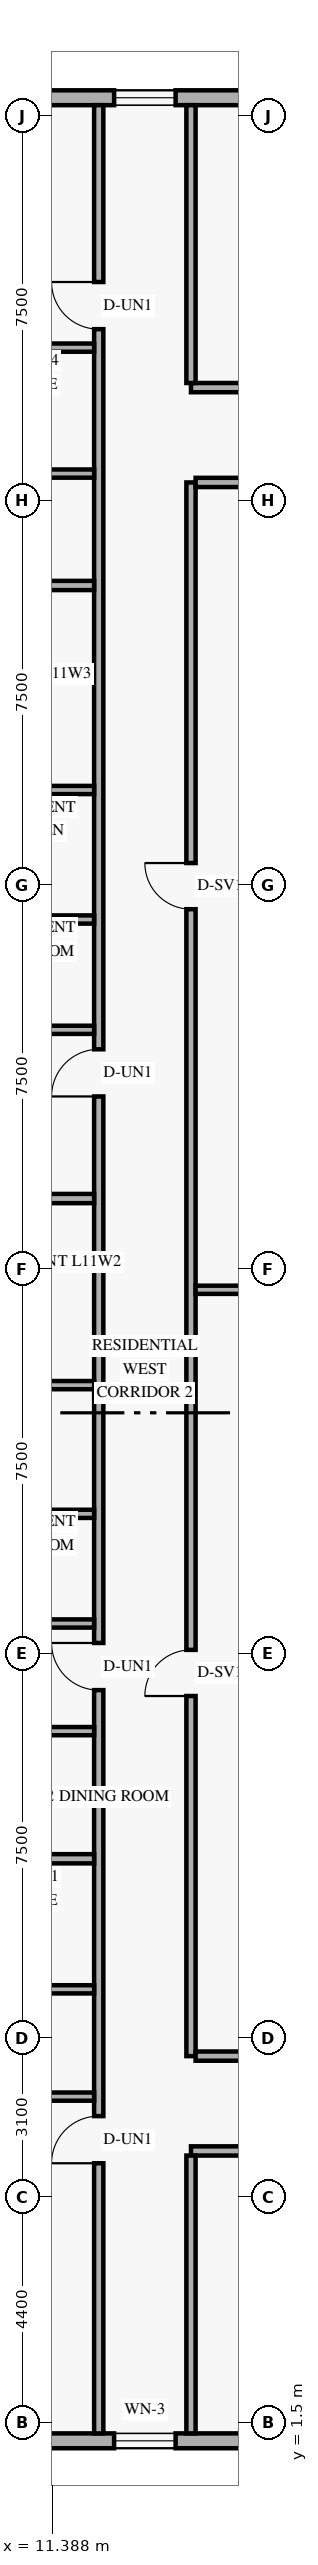
"""IFC4 building model, lengths in metres.
Left out: names, types, materials, properties, quantities, classifications, styles, units other than length and angle.
Written with IfcOpenShell. Run it as: python <this file> out.ifc"""

import sys

from ifc_helpers import new_model, si_unit, direction, frame, frame_2d, origin, place, context, subcontext, project, spatial, rectangle, extrude, element, fill, save


model = new_model("IFC4")
c1 = context("Model", 3, precision=1e-05, world=origin(), true_north=direction((0.0, 1.0)))
c2 = subcontext(c1, "Body", "Model", "MODEL_VIEW")
j1 = project(units=[si_unit("LENGTHUNIT", "METRE"), si_unit("PLANEANGLEUNIT", "RADIAN")], contexts=[c1])
p1 = place(None, origin())
s1 = spatial("IfcSite", under=j1, at=p1, CompositionType="ELEMENT")
p2 = place(p1, origin())
s2 = spatial("IfcBuilding", under=s1, at=p2, CompositionType="ELEMENT")
p3 = place(p2, frame((0.0, 0.0, 45.6)))
s3 = spatial("IfcBuildingStorey", under=s2, at=p3, CompositionType="ELEMENT", Elevation=45.6)
p4 = place(p3, frame((5.42, 1.145, 0.0), z_axis=(0.0, 0.0, 1.0), x_axis=(1.0, 0.0, 0.0)))
e1 = element("IfcWall", 1, at=p4, inside=s3, PredefinedType="SOLIDWALL", context=c2, shape_type="SweptSolid", body=[
    extrude(rectangle(XDim=39.56, YDim=0.29, at=frame_2d((19.78, 0.0))), origin(), (0.0, 0.0, 1.0), 3.36),
])
p5 = place(p4, frame((2.54, 0.0, 0.85)))
e2 = element("IfcOpeningElement", 2, at=p5, cuts=e1, PredefinedType="OPENING", context=c2, shape_type="SweptSolid", body=[
    extrude(rectangle(XDim=1.8, YDim=1.6, at=frame_2d((0.9, 0.8))), frame((0.0, 0.155, 0.0), z_axis=(0.0, -1.0, 0.0), x_axis=(1.0, 0.0, 0.0)), (0.0, 0.0, 1.0), 0.31),
])
p6 = place(p4, frame((7.18, 0.0, 0.85)))
e3 = element("IfcOpeningElement", 3, at=p6, cuts=e1, PredefinedType="OPENING", context=c2, shape_type="SweptSolid", body=[
    extrude(rectangle(XDim=1.2, YDim=1.5, at=frame_2d((0.6, 0.75))), frame((0.0, 0.155, 0.0), z_axis=(0.0, -1.0, 0.0), x_axis=(1.0, 0.0, 0.0)), (0.0, 0.0, 1.0), 0.31),
])
p7 = place(p4, frame((12.257, 0.0, 0.85)))
e4 = element("IfcOpeningElement", 4, at=p7, cuts=e1, PredefinedType="OPENING", context=c2, shape_type="SweptSolid", body=[
    extrude(rectangle(XDim=1.8, YDim=1.6, at=frame_2d((0.9, 0.8))), frame((0.0, 0.155, 0.0), z_axis=(0.0, -1.0, 0.0), x_axis=(1.0, 0.0, 0.0)), (0.0, 0.0, 1.0), 0.31),
])
p8 = place(p4, frame((20.847, 0.0, 0.85)))
e5 = element("IfcOpeningElement", 5, at=p8, cuts=e1, PredefinedType="OPENING", context=c2, shape_type="SweptSolid", body=[
    extrude(rectangle(XDim=1.8, YDim=1.6, at=frame_2d((0.9, 0.8))), frame((0.0, 0.155, 0.0), z_axis=(0.0, -1.0, 0.0), x_axis=(1.0, 0.0, 0.0)), (0.0, 0.0, 1.0), 0.31),
])
p9 = place(p4, frame((27.03, 0.0, 0.85)))
e6 = element("IfcOpeningElement", 6, at=p9, cuts=e1, PredefinedType="OPENING", context=c2, shape_type="SweptSolid", body=[
    extrude(rectangle(XDim=1.8, YDim=1.6, at=frame_2d((0.9, 0.8))), frame((0.0, 0.155, 0.0), z_axis=(0.0, -1.0, 0.0), x_axis=(1.0, 0.0, 0.0)), (0.0, 0.0, 1.0), 0.31),
])
p10 = place(p4, frame((30.465, 0.0, 0.85)))
e7 = element("IfcOpeningElement", 7, at=p10, cuts=e1, PredefinedType="OPENING", context=c2, shape_type="SweptSolid", body=[
    extrude(rectangle(XDim=1.2, YDim=1.5, at=frame_2d((0.6, 0.75))), frame((0.0, 0.155, 0.0), z_axis=(0.0, -1.0, 0.0), x_axis=(1.0, 0.0, 0.0)), (0.0, 0.0, 1.0), 0.31),
])
p11 = place(p4, frame((34.945, 0.0, 0.85)))
e8 = element("IfcOpeningElement", 8, at=p11, cuts=e1, PredefinedType="OPENING", context=c2, shape_type="SweptSolid", body=[
    extrude(rectangle(XDim=1.8, YDim=1.6, at=frame_2d((0.9, 0.8))), frame((0.0, 0.155, 0.0), z_axis=(0.0, -1.0, 0.0), x_axis=(1.0, 0.0, 0.0)), (0.0, 0.0, 1.0), 0.31),
])
p12 = place(p3, frame((44.98, 46.855, 0.0), z_axis=(0.0, 0.0, 1.0), x_axis=(-1.0, 0.0, 0.0)))
e9 = element("IfcWall", 9, at=p12, inside=s3, PredefinedType="SOLIDWALL", context=c2, shape_type="SweptSolid", body=[
    extrude(rectangle(XDim=39.56, YDim=0.29, at=frame_2d((19.78, 0.0))), origin(), (0.0, 0.0, 1.0), 3.36),
])
p13 = place(p12, frame((35.22, 0.0, 0.85)))
e10 = element("IfcOpeningElement", 10, at=p13, cuts=e9, PredefinedType="OPENING", context=c2, shape_type="SweptSolid", body=[
    extrude(rectangle(XDim=1.8, YDim=1.6, at=frame_2d((0.9, 0.8))), frame((0.0, 0.155, 0.0), z_axis=(0.0, -1.0, 0.0), x_axis=(1.0, 0.0, 0.0)), (0.0, 0.0, 1.0), 0.31),
])
p14 = place(p12, frame((31.18, 0.0, 0.85)))
e11 = element("IfcOpeningElement", 11, at=p14, cuts=e9, PredefinedType="OPENING", context=c2, shape_type="SweptSolid", body=[
    extrude(rectangle(XDim=1.2, YDim=1.5, at=frame_2d((0.6, 0.75))), frame((0.0, 0.155, 0.0), z_axis=(0.0, -1.0, 0.0), x_axis=(1.0, 0.0, 0.0)), (0.0, 0.0, 1.0), 0.31),
])
p15 = place(p12, frame((24.863, 0.0, 0.85)))
e12 = element("IfcOpeningElement", 12, at=p15, cuts=e9, PredefinedType="OPENING", context=c2, shape_type="SweptSolid", body=[
    extrude(rectangle(XDim=1.8, YDim=1.6, at=frame_2d((0.9, 0.8))), frame((0.0, 0.155, 0.0), z_axis=(0.0, -1.0, 0.0), x_axis=(1.0, 0.0, 0.0)), (0.0, 0.0, 1.0), 0.31),
])
p16 = place(p12, frame((16.273, 0.0, 0.85)))
e13 = element("IfcOpeningElement", 13, at=p16, cuts=e9, PredefinedType="OPENING", context=c2, shape_type="SweptSolid", body=[
    extrude(rectangle(XDim=1.8, YDim=1.6, at=frame_2d((0.9, 0.8))), frame((0.0, 0.155, 0.0), z_axis=(0.0, -1.0, 0.0), x_axis=(1.0, 0.0, 0.0)), (0.0, 0.0, 1.0), 0.31),
])
p17 = place(p12, frame((10.73, 0.0, 0.85)))
e14 = element("IfcOpeningElement", 14, at=p17, cuts=e9, PredefinedType="OPENING", context=c2, shape_type="SweptSolid", body=[
    extrude(rectangle(XDim=1.8, YDim=1.6, at=frame_2d((0.9, 0.8))), frame((0.0, 0.155, 0.0), z_axis=(0.0, -1.0, 0.0), x_axis=(1.0, 0.0, 0.0)), (0.0, 0.0, 1.0), 0.31),
])
p18 = place(p12, frame((7.895, 0.0, 0.85)))
e15 = element("IfcOpeningElement", 15, at=p18, cuts=e9, PredefinedType="OPENING", context=c2, shape_type="SweptSolid", body=[
    extrude(rectangle(XDim=1.2, YDim=1.5, at=frame_2d((0.6, 0.75))), frame((0.0, 0.155, 0.0), z_axis=(0.0, -1.0, 0.0), x_axis=(1.0, 0.0, 0.0)), (0.0, 0.0, 1.0), 0.31),
])
p19 = place(p12, frame((3.782, 0.0, 0.85)))
e16 = element("IfcOpeningElement", 16, at=p19, cuts=e9, PredefinedType="OPENING", context=c2, shape_type="SweptSolid", body=[
    extrude(rectangle(XDim=1.8, YDim=1.6, at=frame_2d((0.9, 0.8))), frame((0.0, 0.155, 0.0), z_axis=(0.0, -1.0, 0.0), x_axis=(1.0, 0.0, 0.0)), (0.0, 0.0, 1.0), 0.31),
])
p20 = place(p12, frame((0.367, 0.0, 0.85)))
e17 = element("IfcOpeningElement", 17, at=p20, cuts=e9, PredefinedType="OPENING", context=c2, shape_type="SweptSolid", body=[
    extrude(rectangle(XDim=1.2, YDim=1.5, at=frame_2d((0.6, 0.75))), frame((0.0, 0.155, 0.0), z_axis=(0.0, -1.0, 0.0), x_axis=(1.0, 0.0, 0.0)), (0.0, 0.0, 1.0), 0.31),
])
p21 = place(p3, frame((14.1, 6.8, 0.0), z_axis=(0.0, 0.0, 1.0), x_axis=(1.0, 0.0, 0.0)))
e18 = element("IfcWall", 18, at=p21, inside=s3, PredefinedType="STANDARD", context=c2, shape_type="SweptSolid", body=[
    extrude(rectangle(XDim=21.32, YDim=0.18, at=frame_2d((10.66, 0.0))), origin(), (0.0, 0.0, 1.0), 2.649),
])
p22 = place(p21, frame((1.5, 0.0, 0.0)))
e19 = element("IfcOpeningElement", 19, at=p22, cuts=e18, PredefinedType="OPENING", context=c2, shape_type="SweptSolid", body=[
    extrude(rectangle(XDim=0.95, YDim=2.15, at=frame_2d((0.475, 1.075))), frame((0.0, 0.1, 0.0), z_axis=(0.0, -1.0, 0.0), x_axis=(1.0, 0.0, 0.0)), (0.0, 0.0, 1.0), 0.2),
])
p23 = place(p21, frame((10.625, 0.0, 0.0)))
e20 = element("IfcOpeningElement", 20, at=p23, cuts=e18, PredefinedType="OPENING", context=c2, shape_type="SweptSolid", body=[
    extrude(rectangle(XDim=0.92, YDim=2.15, at=frame_2d((0.46, 1.075))), frame((0.0, 0.1, 0.0), z_axis=(0.0, -1.0, 0.0), x_axis=(1.0, 0.0, 0.0)), (0.0, 0.0, 1.0), 0.2),
])
p24 = place(p3, frame((14.1, 41.2, 0.0), z_axis=(0.0, 0.0, 1.0), x_axis=(1.0, 0.0, 0.0)))
e21 = element("IfcWall", 21, at=p24, inside=s3, PredefinedType="STANDARD", context=c2, shape_type="SweptSolid", body=[
    extrude(rectangle(XDim=21.32, YDim=0.18, at=frame_2d((10.66, 0.0))), origin(), (0.0, 0.0, 1.0), 2.649),
])
p25 = place(p24, frame((1.6, 0.0, 0.0)))
e22 = element("IfcOpeningElement", 22, at=p25, cuts=e21, PredefinedType="OPENING", context=c2, shape_type="SweptSolid", body=[
    extrude(rectangle(XDim=0.95, YDim=2.15, at=frame_2d((0.475, 1.075))), frame((0.0, 0.1, 0.0), z_axis=(0.0, -1.0, 0.0), x_axis=(1.0, 0.0, 0.0)), (0.0, 0.0, 1.0), 0.2),
])
p26 = place(p24, frame((10.644, 0.0, 0.0)))
e23 = element("IfcOpeningElement", 23, at=p26, cuts=e21, PredefinedType="OPENING", context=c2, shape_type="SweptSolid", body=[
    extrude(rectangle(XDim=0.92, YDim=2.15, at=frame_2d((0.46, 1.075))), frame((0.0, 0.1, 0.0), z_axis=(0.0, -1.0, 0.0), x_axis=(1.0, 0.0, 0.0)), (0.0, 0.0, 1.0), 0.2),
])
p27 = place(p3, frame((12.3, 1.29, 0.0), z_axis=(0.0, 0.0, 1.0), x_axis=(0.0, 1.0, 0.0)))
e24 = element("IfcWall", 24, at=p27, inside=s3, PredefinedType="STANDARD", context=c2, shape_type="SweptSolid", body=[
    extrude(rectangle(XDim=45.42, YDim=0.18, at=frame_2d((22.71, 0.0))), origin(), (0.0, 0.0, 1.0), 2.649),
])
p28 = place(p27, frame((5.27, 0.0, 0.0)))
e25 = element("IfcOpeningElement", 25, at=p28, cuts=e24, PredefinedType="OPENING", context=c2, shape_type="SweptSolid", body=[
    extrude(rectangle(XDim=0.92, YDim=2.15, at=frame_2d((0.46, 1.075))), frame((0.0, 0.1, 0.0), z_axis=(0.0, -1.0, 0.0), x_axis=(1.0, 0.0, 0.0)), (0.0, 0.0, 1.0), 0.2),
])
p29 = place(p27, frame((14.5, 0.0, 0.0)))
e26 = element("IfcOpeningElement", 26, at=p29, cuts=e24, PredefinedType="OPENING", context=c2, shape_type="SweptSolid", body=[
    extrude(rectangle(XDim=0.92, YDim=2.15, at=frame_2d((0.46, 1.075))), frame((0.0, 0.1, 0.0), z_axis=(0.0, -1.0, 0.0), x_axis=(1.0, 0.0, 0.0)), (0.0, 0.0, 1.0), 0.2),
])
p30 = place(p27, frame((26.082, 0.0, 0.0)))
e27 = element("IfcOpeningElement", 27, at=p30, cuts=e24, PredefinedType="OPENING", context=c2, shape_type="SweptSolid", body=[
    extrude(rectangle(XDim=0.92, YDim=2.15, at=frame_2d((0.46, 1.075))), frame((0.0, 0.1, 0.0), z_axis=(0.0, -1.0, 0.0), x_axis=(1.0, 0.0, 0.0)), (0.0, 0.0, 1.0), 0.2),
])
p31 = place(p27, frame((41.05, 0.0, 0.0)))
e28 = element("IfcOpeningElement", 28, at=p31, cuts=e24, PredefinedType="OPENING", context=c2, shape_type="SweptSolid", body=[
    extrude(rectangle(XDim=0.92, YDim=2.15, at=frame_2d((0.46, 1.075))), frame((0.0, 0.1, 0.0), z_axis=(0.0, -1.0, 0.0), x_axis=(1.0, 0.0, 0.0)), (0.0, 0.0, 1.0), 0.2),
])
p32 = place(p3, frame((14.1, 8.65, 0.0), z_axis=(0.0, 0.0, 1.0), x_axis=(0.0, 1.0, 0.0)))
e29 = element("IfcWall", 29, at=p32, inside=s3, PredefinedType="STANDARD", context=c2, shape_type="SweptSolid", body=[
    extrude(rectangle(XDim=30.7, YDim=0.18, at=frame_2d((15.35, 0.0))), origin(), (0.0, 0.0, 1.0), 2.649),
])
p33 = place(p32, frame((7.025, 0.0, 0.0)))
e30 = element("IfcOpeningElement", 30, at=p33, cuts=e29, PredefinedType="OPENING", context=c2, shape_type="SweptSolid", body=[
    extrude(rectangle(XDim=0.9, YDim=2.1, at=frame_2d((0.45, 1.05))), frame((0.0, 0.1, 0.0), z_axis=(0.0, -1.0, 0.0), x_axis=(1.0, 0.0, 0.0)), (0.0, 0.0, 1.0), 0.2),
])
p34 = place(p32, frame((22.375, 0.0, 0.0)))
e31 = element("IfcOpeningElement", 31, at=p34, cuts=e29, PredefinedType="OPENING", context=c2, shape_type="SweptSolid", body=[
    extrude(rectangle(XDim=0.9, YDim=2.1, at=frame_2d((0.45, 1.05))), frame((0.0, 0.1, 0.0), z_axis=(0.0, -1.0, 0.0), x_axis=(1.0, 0.0, 0.0)), (0.0, 0.0, 1.0), 0.2),
])
for number, where, z_axis, x_axis in (
    (32, (14.19, 8.65, 0.0), (0.0, 0.0, 1.0), (1.0, 0.0, 0.0)),
    (33, (14.19, 39.35, 0.0), (0.0, 0.0, 1.0), (1.0, 0.0, 0.0)),
):
    element("IfcWall", number, at=place(p3, frame(where, z_axis=z_axis, x_axis=x_axis)), inside=s3, PredefinedType="STANDARD", context=c2, shape_type="SweptSolid", body=[
        extrude(rectangle(XDim=7.37, YDim=0.18, at=frame_2d((3.685, 0.0))), origin(), (0.0, 0.0, 1.0), 2.649),
    ])
for number, where, z_axis, x_axis in (
    (34, (14.1, 1.29, 0.0), (0.0, 0.0, 1.0), (0.0, 1.0, 0.0)),
    (35, (14.1, 41.29, 0.0), (0.0, 0.0, 1.0), (0.0, 1.0, 0.0)),
):
    element("IfcWall", number, at=place(p3, frame(where, z_axis=z_axis, x_axis=x_axis)), inside=s3, PredefinedType="PARTITIONING", context=c2, shape_type="SweptSolid", body=[
        extrude(rectangle(XDim=5.42, YDim=0.18, at=frame_2d((2.71, 0.0))), origin(), (0.0, 0.0, 1.0), 2.809),
    ])
p35 = place(p3, frame((8.43, 7.86, 0.0), z_axis=(0.0, 0.0, 1.0), x_axis=(1.0, 0.0, 0.0)))
e36 = element("IfcWall", 36, at=p35, inside=s3, PredefinedType="PLUMBINGWALL", context=c2, shape_type="SweptSolid", body=[
    extrude(rectangle(XDim=3.78, YDim=0.16, at=frame_2d((1.89, 0.0))), origin(), (0.0, 0.0, 1.0), 2.649),
])
p36 = place(p3, frame((8.59, 9.953, 0.0), z_axis=(0.0, 0.0, 1.0), x_axis=(1.0, 0.0, 0.0)))
e37 = element("IfcWall", 37, at=p36, inside=s3, PredefinedType="PLUMBINGWALL", context=c2, shape_type="SweptSolid", body=[
    extrude(rectangle(XDim=3.62, YDim=0.16, at=frame_2d((1.81, 0.0))), origin(), (0.0, 0.0, 1.0), 2.649),
])
p37 = place(p3, frame((2.09, 12.5, 0.0), z_axis=(0.0, 0.0, 1.0), x_axis=(1.0, 0.0, 0.0)))
e38 = element("IfcWall", 38, at=p37, inside=s3, PredefinedType="PARTITIONING", context=c2, shape_type="SweptSolid", body=[
    extrude(rectangle(XDim=10.12, YDim=0.18, at=frame_2d((5.06, 0.0))), origin(), (0.0, 0.0, 1.0), 2.649),
])
p38 = place(p3, frame((2.09, 21.74, 0.0), z_axis=(0.0, 0.0, 1.0), x_axis=(1.0, 0.0, 0.0)))
e39 = element("IfcWall", 39, at=p38, inside=s3, PredefinedType="PARTITIONING", context=c2, shape_type="SweptSolid", body=[
    extrude(rectangle(XDim=10.12, YDim=0.16, at=frame_2d((5.06, 0.0))), origin(), (0.0, 0.0, 1.0), 2.649),
])
p39 = place(p38, frame((7.185, 0.0, 0.0)))
e40 = element("IfcOpeningElement", 40, at=p39, cuts=e39, PredefinedType="OPENING", context=c2, shape_type="SweptSolid", body=[
    extrude(rectangle(XDim=0.88, YDim=2.12, at=frame_2d((0.44, 1.06))), frame((0.0, 0.09, 0.0), z_axis=(0.0, -1.0, 0.0), x_axis=(1.0, 0.0, 0.0)), (0.0, 0.0, 1.0), 0.18),
])
p40 = place(p38, frame((1.955, 0.0, 0.0)))
e41 = element("IfcOpeningElement", 41, at=p40, cuts=e39, PredefinedType="OPENING", context=c2, shape_type="SweptSolid", body=[
    extrude(rectangle(XDim=0.9, YDim=2.14, at=frame_2d((0.45, 1.07))), frame((0.0, 0.09, 0.0), z_axis=(0.0, -1.0, 0.0), x_axis=(1.0, 0.0, 0.0)), (0.0, 0.0, 1.0), 0.18),
])
p41 = place(p3, frame((8.43, 17.09, 0.0), z_axis=(0.0, 0.0, 1.0), x_axis=(1.0, 0.0, 0.0)))
e42 = element("IfcWall", 42, at=p41, inside=s3, PredefinedType="PLUMBINGWALL", context=c2, shape_type="SweptSolid", body=[
    extrude(rectangle(XDim=3.78, YDim=0.16, at=frame_2d((1.89, 0.0))), origin(), (0.0, 0.0, 1.0), 2.649),
])
p42 = place(p3, frame((8.59, 19.229, 0.0), z_axis=(0.0, 0.0, 1.0), x_axis=(1.0, 0.0, 0.0)))
e43 = element("IfcWall", 43, at=p42, inside=s3, PredefinedType="PLUMBINGWALL", context=c2, shape_type="SweptSolid", body=[
    extrude(rectangle(XDim=3.62, YDim=0.16, at=frame_2d((1.81, 0.0))), origin(), (0.0, 0.0, 1.0), 2.649),
])
p43 = place(p3, frame((2.09, 14.99, 0.0), z_axis=(0.0, 0.0, 1.0), x_axis=(1.0, 0.0, 0.0)))
e44 = element("IfcWall", 44, at=p43, inside=s3, PredefinedType="PARTITIONING", context=c2, shape_type="SweptSolid", body=[
    extrude(rectangle(XDim=10.12, YDim=0.16, at=frame_2d((5.06, 0.0))), origin(), (0.0, 0.0, 1.0), 2.649),
])
p44 = place(p43, frame((4.51, 0.0, 0.0)))
e45 = element("IfcOpeningElement", 45, at=p44, cuts=e44, PredefinedType="OPENING", context=c2, shape_type="SweptSolid", body=[
    extrude(rectangle(XDim=0.95, YDim=2.15, at=frame_2d((0.475, 1.075))), frame((0.0, 0.09, 0.0), z_axis=(0.0, -1.0, 0.0), x_axis=(1.0, 0.0, 0.0)), (0.0, 0.0, 1.0), 0.18),
])
p45 = place(p3, frame((2.09, 25.38, 0.0), z_axis=(0.0, 0.0, 1.0), x_axis=(1.0, 0.0, 0.0)))
e46 = element("IfcWall", 46, at=p45, inside=s3, PredefinedType="PARTITIONING", context=c2, shape_type="SweptSolid", body=[
    extrude(rectangle(XDim=10.12, YDim=0.18, at=frame_2d((5.06, 0.0))), origin(), (0.0, 0.0, 1.0), 2.649),
])
p46 = place(p3, frame((2.09, 33.35, 0.0), z_axis=(0.0, 0.0, 1.0), x_axis=(1.0, 0.0, 0.0)))
e47 = element("IfcWall", 47, at=p46, inside=s3, PredefinedType="PARTITIONING", context=c2, shape_type="SweptSolid", body=[
    extrude(rectangle(XDim=10.12, YDim=0.16, at=frame_2d((5.06, 0.0))), origin(), (0.0, 0.0, 1.0), 2.649),
])
p47 = place(p46, frame((1.94, 0.0, 0.0)))
e48 = element("IfcOpeningElement", 48, at=p47, cuts=e47, PredefinedType="OPENING", context=c2, shape_type="SweptSolid", body=[
    extrude(rectangle(XDim=0.88, YDim=2.14, at=frame_2d((0.44, 1.07))), frame((0.0, 0.09, 0.0), z_axis=(0.0, -1.0, 0.0), x_axis=(1.0, 0.0, 0.0)), (0.0, 0.0, 1.0), 0.18),
])
p48 = place(p46, frame((5.26, 0.0, 0.0)))
e49 = element("IfcOpeningElement", 49, at=p48, cuts=e47, PredefinedType="OPENING", context=c2, shape_type="SweptSolid", body=[
    extrude(rectangle(XDim=0.88, YDim=2.14, at=frame_2d((0.44, 1.07))), frame((0.0, 0.09, 0.0), z_axis=(0.0, -1.0, 0.0), x_axis=(1.0, 0.0, 0.0)), (0.0, 0.0, 1.0), 0.18),
])
p49 = place(p3, frame((8.43, 28.671, 0.0), z_axis=(0.0, 0.0, 1.0), x_axis=(1.0, 0.0, 0.0)))
e50 = element("IfcWall", 50, at=p49, inside=s3, PredefinedType="PLUMBINGWALL", context=c2, shape_type="SweptSolid", body=[
    extrude(rectangle(XDim=3.78, YDim=0.16, at=frame_2d((1.89, 0.0))), origin(), (0.0, 0.0, 1.0), 2.649),
])
p50 = place(p3, frame((8.59, 30.823, 0.0), z_axis=(0.0, 0.0, 1.0), x_axis=(1.0, 0.0, 0.0)))
e51 = element("IfcWall", 51, at=p50, inside=s3, PredefinedType="PLUMBINGWALL", context=c2, shape_type="SweptSolid", body=[
    extrude(rectangle(XDim=3.62, YDim=0.16, at=frame_2d((1.81, 0.0))), origin(), (0.0, 0.0, 1.0), 2.649),
])
p51 = place(p3, frame((2.09, 37.34, 0.0), z_axis=(0.0, 0.0, 1.0), x_axis=(1.0, 0.0, 0.0)))
e52 = element("IfcWall", 52, at=p51, inside=s3, PredefinedType="PARTITIONING", context=c2, shape_type="SweptSolid", body=[
    extrude(rectangle(XDim=10.12, YDim=0.18, at=frame_2d((5.06, 0.0))), origin(), (0.0, 0.0, 1.0), 2.649),
])
p52 = place(p3, frame((8.43, 41.98, 0.0), z_axis=(0.0, 0.0, 1.0), x_axis=(1.0, 0.0, 0.0)))
e53 = element("IfcWall", 53, at=p52, inside=s3, PredefinedType="PLUMBINGWALL", context=c2, shape_type="SweptSolid", body=[
    extrude(rectangle(XDim=3.78, YDim=0.16, at=frame_2d((1.89, 0.0))), origin(), (0.0, 0.0, 1.0), 2.809),
])
p53 = place(p3, frame((8.59, 39.523, 0.0), z_axis=(0.0, 0.0, 1.0), x_axis=(1.0, 0.0, 0.0)))
e54 = element("IfcWall", 54, at=p53, inside=s3, PredefinedType="PLUMBINGWALL", context=c2, shape_type="SweptSolid", body=[
    extrude(rectangle(XDim=3.62, YDim=0.16, at=frame_2d((1.81, 0.0))), origin(), (0.0, 0.0, 1.0), 2.649),
])
p54 = place(p3, frame((14.19, 23.6, 0.0), z_axis=(0.0, 0.0, 1.0), x_axis=(1.0, 0.0, 0.0)))
e55 = element("IfcWall", 55, at=p54, inside=s3, PredefinedType="PARTITIONING", context=c2, shape_type="SweptSolid", body=[
    extrude(rectangle(XDim=7.37, YDim=0.16, at=frame_2d((3.685, 0.0))), origin(), (0.0, 0.0, 1.0), 2.649),
])
p55 = place(p6, origin())
e56 = element("IfcWindow", 56, at=p55, inside=s3, PartitioningType="SINGLE_PANEL", PredefinedType="WINDOW", context=c2, shape_type="SweptSolid", body=[
    extrude(rectangle(XDim=1.2, YDim=1.5, at=frame_2d((0.6, 0.75))), frame((0.0, 0.03, 0.0), z_axis=(0.0, -1.0, 0.0), x_axis=(1.0, 0.0, 0.0)), (0.0, 0.0, 1.0), 0.06),
])
fill(e3, e56)
p56 = place(p14, origin())
e57 = element("IfcWindow", 57, at=p56, inside=s3, PartitioningType="SINGLE_PANEL", PredefinedType="WINDOW", context=c2, shape_type="SweptSolid", body=[
    extrude(rectangle(XDim=1.2, YDim=1.5, at=frame_2d((0.6, 0.75))), frame((0.0, 0.03, 0.0), z_axis=(0.0, -1.0, 0.0), x_axis=(1.0, 0.0, 0.0)), (0.0, 0.0, 1.0), 0.06),
])
fill(e11, e57)
p57 = place(p28, origin())
e58 = element("IfcDoor", 58, at=p57, inside=s3, OperationType="SINGLE_SWING_LEFT", PredefinedType="DOOR", context=c2, shape_type="SweptSolid", body=[
    extrude(rectangle(XDim=0.92, YDim=2.15, at=frame_2d((0.46, 1.075))), frame((0.0, 0.025, 0.0), z_axis=(0.0, -1.0, 0.0), x_axis=(1.0, 0.0, 0.0)), (0.0, 0.0, 1.0), 0.05),
])
fill(e25, e58)
p58 = place(p29, origin())
e59 = element("IfcDoor", 59, at=p58, inside=s3, OperationType="SINGLE_SWING_RIGHT", PredefinedType="DOOR", context=c2, shape_type="SweptSolid", body=[
    extrude(rectangle(XDim=0.92, YDim=2.15, at=frame_2d((0.46, 1.075))), frame((0.0, 0.025, 0.0), z_axis=(0.0, -1.0, 0.0), x_axis=(1.0, 0.0, 0.0)), (0.0, 0.0, 1.0), 0.05),
])
fill(e26, e59)
p59 = place(p30, origin())
e60 = element("IfcDoor", 60, at=p59, inside=s3, OperationType="SINGLE_SWING_LEFT", PredefinedType="DOOR", context=c2, shape_type="SweptSolid", body=[
    extrude(rectangle(XDim=0.92, YDim=2.15, at=frame_2d((0.46, 1.075))), frame((0.0, 0.025, 0.0), z_axis=(0.0, -1.0, 0.0), x_axis=(1.0, 0.0, 0.0)), (0.0, 0.0, 1.0), 0.05),
])
fill(e27, e60)
p60 = place(p31, origin())
e61 = element("IfcDoor", 61, at=p60, inside=s3, OperationType="SINGLE_SWING_RIGHT", PredefinedType="DOOR", context=c2, shape_type="SweptSolid", body=[
    extrude(rectangle(XDim=0.92, YDim=2.15, at=frame_2d((0.46, 1.075))), frame((0.0, 0.025, 0.0), z_axis=(0.0, -1.0, 0.0), x_axis=(1.0, 0.0, 0.0)), (0.0, 0.0, 1.0), 0.05),
])
fill(e28, e61)
p61 = place(p33, origin())
e62 = element("IfcDoor", 62, at=p61, inside=s3, OperationType="SINGLE_SWING_LEFT", PredefinedType="DOOR", context=c2, shape_type="SweptSolid", body=[
    extrude(rectangle(XDim=0.9, YDim=2.1, at=frame_2d((0.45, 1.05))), frame((0.0, 0.025, 0.0), z_axis=(0.0, -1.0, 0.0), x_axis=(1.0, 0.0, 0.0)), (0.0, 0.0, 1.0), 0.05),
])
fill(e30, e62)
p62 = place(p34, origin())
e63 = element("IfcDoor", 63, at=p62, inside=s3, OperationType="SINGLE_SWING_RIGHT", PredefinedType="DOOR", context=c2, shape_type="SweptSolid", body=[
    extrude(rectangle(XDim=0.9, YDim=2.1, at=frame_2d((0.45, 1.05))), frame((0.0, 0.025, 0.0), z_axis=(0.0, -1.0, 0.0), x_axis=(1.0, 0.0, 0.0)), (0.0, 0.0, 1.0), 0.05),
])
fill(e31, e63)
save(model, sys.argv[1])
